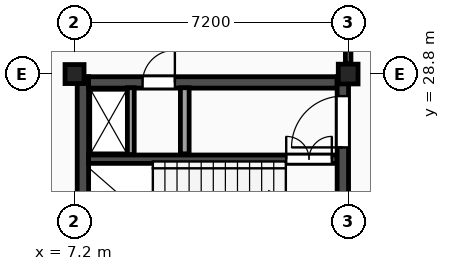
"""IFC4 building model, lengths in metres.
Left out: names, types, materials, properties, quantities, classifications, styles, units other than length and angle.
Written with IfcOpenShell. Run it as: python <this file> out.ifc"""

import sys

from ifc_helpers import new_model, si_unit, direction, frame, frame_2d, origin, origin_2d, place, context, subcontext, project, spatial, rectangle, extrude, element, fill, save


model = new_model("IFC4")
c1 = context("Model", 3, precision=1e-05, world=origin(), true_north=direction((0.0, 1.0)))
c2 = subcontext(c1, "Body", "Model", "MODEL_VIEW")
j1 = project(units=[si_unit("LENGTHUNIT", "METRE"), si_unit("PLANEANGLEUNIT", "RADIAN")], contexts=[c1])
p1 = place(None, origin())
s1 = spatial("IfcSite", under=j1, at=p1, CompositionType="ELEMENT")
p2 = place(p1, origin())
s2 = spatial("IfcBuilding", under=s1, at=p2, CompositionType="ELEMENT")
p3 = place(p2, frame((0.0, 0.0, 26.7)))
s3 = spatial("IfcBuildingStorey", under=s2, at=p3, CompositionType="ELEMENT", Elevation=26.7)
p4 = place(p3, frame((7.2, 28.8, 0.0), z_axis=(0.0, 0.0, 1.0), x_axis=(1.0, 0.0, 0.0)))
e1 = element("IfcColumn", 1, at=p4, inside=s3, PredefinedType="COLUMN", context=c2, shape_type="SweptSolid", body=[
    extrude(rectangle(XDim=0.5, YDim=0.5, at=origin_2d()), origin(), (0.0, 0.0, 1.0), 3.9),
])
p5 = place(p3, frame((14.4, 28.8, 0.0), z_axis=(0.0, 0.0, 1.0), x_axis=(1.0, 0.0, 0.0)))
e2 = element("IfcColumn", 2, at=p5, inside=s3, PredefinedType="COLUMN", context=c2, shape_type="SweptSolid", body=[
    extrude(rectangle(XDim=0.52, YDim=0.52, at=origin_2d()), origin(), (0.0, 0.0, 1.0), 3.9),
])
p6 = place(p3, frame((7.42, 28.73, 0.0), z_axis=(0.0, 0.0, 1.0), x_axis=(0.0, -1.0, 0.0)))
e3 = element("IfcWall", 3, at=p6, inside=s3, PredefinedType="SHEAR", context=c2, shape_type="SweptSolid", body=[
    extrude(rectangle(XDim=7.06, YDim=0.3, at=frame_2d((3.53, 0.0))), origin(), (0.0, 0.0, 1.0), 3.67),
])
p7 = place(p3, frame((7.57, 28.58, 0.0), z_axis=(0.0, 0.0, 1.0), x_axis=(1.0, 0.0, 0.0)))
e4 = element("IfcWall", 4, at=p7, inside=s3, PredefinedType="SHEAR", context=c2, shape_type="SweptSolid", body=[
    extrude(rectangle(XDim=6.54, YDim=0.3, at=frame_2d((3.27, 0.0))), origin(), (0.0, 0.0, 1.0), 3.67),
])
p8 = place(p7, frame((1.42, 0.0, 0.0)))
e5 = element("IfcOpeningElement", 5, at=p8, cuts=e4, PredefinedType="OPENING", context=c2, shape_type="SweptSolid", body=[
    extrude(rectangle(XDim=0.85, YDim=2.1, at=frame_2d((0.425, 1.05))), frame((0.0, 0.16, 0.0), z_axis=(0.0, -1.0, 0.0), x_axis=(1.0, 0.0, 0.0)), (0.0, 0.0, 1.0), 0.32),
])
p9 = place(p3, frame((7.57, 26.56, 0.0), z_axis=(0.0, 0.0, 1.0), x_axis=(1.0, 0.0, 0.0)))
e6 = element("IfcWall", 6, at=p9, inside=s3, PredefinedType="SHEAR", context=c2, shape_type="SweptSolid", body=[
    extrude(rectangle(XDim=6.54, YDim=0.22, at=frame_2d((3.27, 0.0))), origin(), (0.0, 0.0, 1.0), 3.67),
])
p10 = place(p9, frame((5.2, 0.0, 0.0)))
e7 = element("IfcOpeningElement", 7, at=p10, cuts=e6, PredefinedType="OPENING", context=c2, shape_type="SweptSolid", body=[
    extrude(rectangle(XDim=1.2, YDim=2.2, at=frame_2d((0.6, 1.1))), frame((0.0, 0.12, 0.0), z_axis=(0.0, -1.0, 0.0), x_axis=(1.0, 0.0, 0.0)), (0.0, 0.0, 1.0), 0.24),
])
p11 = place(p3, frame((10.1, 26.7, 0.0), z_axis=(0.0, 0.0, 1.0), x_axis=(0.0, 1.0, 0.0)))
e8 = element("IfcWall", 8, at=p11, inside=s3, PredefinedType="PARTITIONING", context=c2, shape_type="SweptSolid", body=[
    extrude(rectangle(XDim=1.74, YDim=0.23, at=frame_2d((0.87, 0.0))), origin(), (0.0, 0.0, 1.0), 3.67),
])
p12 = place(p3, frame((8.68, 26.68, 0.0), z_axis=(0.0, 0.0, 1.0), x_axis=(0.0, 1.0, 0.0)))
e9 = element("IfcWall", 9, at=p12, inside=s3, PredefinedType="PARTITIONING", context=c2, shape_type="SweptSolid", body=[
    extrude(rectangle(XDim=1.76, YDim=0.18, at=frame_2d((0.88, 0.0))), origin(), (0.0, 0.0, 1.0), 3.67),
])
p13 = place(p3, frame((14.26, 21.67, 0.0), z_axis=(0.0, 0.0, 1.0), x_axis=(0.0, 1.0, 0.0)))
e10 = element("IfcWall", 10, at=p13, inside=s3, PredefinedType="SHEAR", context=c2, shape_type="SweptSolid", body=[
    extrude(rectangle(XDim=7.06, YDim=0.3, at=frame_2d((3.53, 0.0))), origin(), (0.0, 0.0, 1.0), 3.67),
])
p14 = place(p13, frame((5.2, 0.0, 0.0)))
e11 = element("IfcOpeningElement", 11, at=p14, cuts=e10, PredefinedType="OPENING", context=c2, shape_type="SweptSolid", body=[
    extrude(rectangle(XDim=1.35, YDim=2.15, at=frame_2d((0.675, 1.075))), frame((0.0, 0.16, 0.0), z_axis=(0.0, -1.0, 0.0), x_axis=(1.0, 0.0, 0.0)), (0.0, 0.0, 1.0), 0.32),
])
p15 = place(p3, frame((14.4, 29.065, 0.0), z_axis=(0.0, 0.0, 1.0), x_axis=(0.0, 1.0, 0.0)))
e12 = element("IfcWall", 12, at=p15, inside=s3, PredefinedType="PARTITIONING", context=c2, shape_type="SweptSolid", body=[
    extrude(rectangle(XDim=6.68, YDim=0.145, at=frame_2d((3.34, 0.0))), origin(), (0.0, 0.0, 1.0), 2.945),
])
p16 = place(p8, origin())
e13 = element("IfcDoor", 13, at=p16, inside=s3, OperationType="SINGLE_SWING_RIGHT", PredefinedType="DOOR", context=c2, shape_type="SweptSolid", body=[
    extrude(rectangle(XDim=0.85, YDim=2.1, at=frame_2d((0.425, 1.05))), frame((0.0, 0.025, 0.0), z_axis=(0.0, -1.0, 0.0), x_axis=(1.0, 0.0, 0.0)), (0.0, 0.0, 1.0), 0.05),
])
fill(e5, e13)
p17 = place(p10, origin())
e14 = element("IfcDoor", 14, at=p17, inside=s3, OperationType="DOUBLE_DOOR_SINGLE_SWING", PredefinedType="DOOR", context=c2, shape_type="SweptSolid", body=[
    extrude(rectangle(XDim=1.2, YDim=2.2, at=frame_2d((0.6, 1.1))), frame((0.0, 0.025, 0.0), z_axis=(0.0, -1.0, 0.0), x_axis=(1.0, 0.0, 0.0)), (0.0, 0.0, 1.0), 0.05),
])
fill(e7, e14)
p18 = place(p14, origin())
e15 = element("IfcDoor", 15, at=p18, inside=s3, OperationType="SINGLE_SWING_LEFT", PredefinedType="DOOR", context=c2, shape_type="SweptSolid", body=[
    extrude(rectangle(XDim=1.35, YDim=2.15, at=frame_2d((0.675, 1.075))), frame((0.0, 0.025, 0.0), z_axis=(0.0, -1.0, 0.0), x_axis=(1.0, 0.0, 0.0)), (0.0, 0.0, 1.0), 0.05),
])
fill(e11, e15)
save(model, sys.argv[1])
